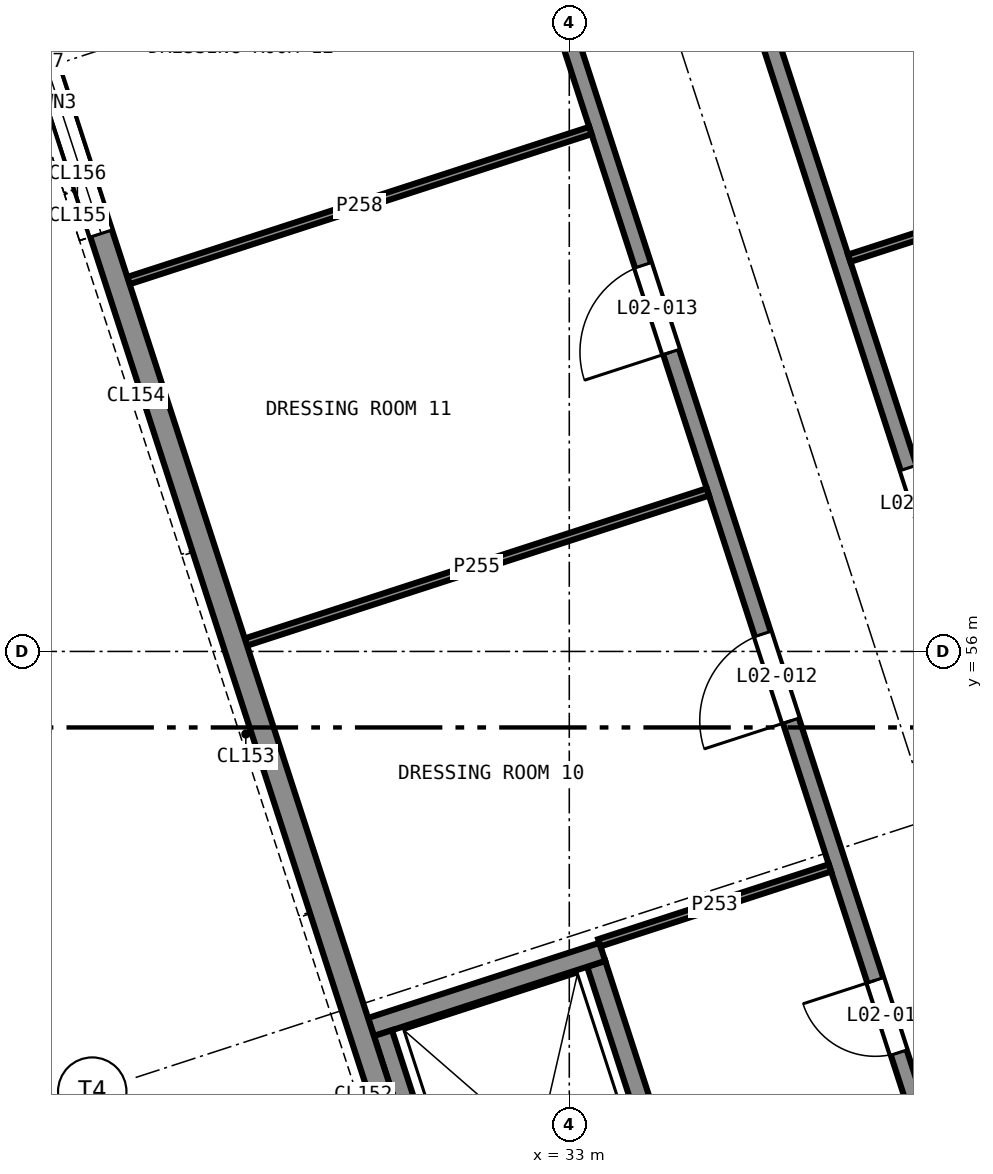
"""IFC4 building model, lengths in metres.
Left out: names, types, materials, properties, quantities, classifications, styles, units other than length and angle.
Written with IfcOpenShell. Run it as: python <this file> out.ifc"""

import sys

from ifc_helpers import new_model, si_unit, direction, frame, frame_2d, origin, place, context, subcontext, project, spatial, rectangle, extrude, element, fill, save


model = new_model("IFC4")
c1 = context("Model", 3, precision=1e-05, world=origin(), true_north=direction((0.0, 1.0)))
c2 = subcontext(c1, "Body", "Model", "MODEL_VIEW")
j1 = project(units=[si_unit("LENGTHUNIT", "METRE"), si_unit("PLANEANGLEUNIT", "RADIAN")], contexts=[c1])
p1 = place(None, origin())
s1 = spatial("IfcSite", under=j1, at=p1, CompositionType="ELEMENT")
p2 = place(p1, origin())
s2 = spatial("IfcBuilding", under=s1, at=p2, CompositionType="ELEMENT")
p3 = place(p2, frame((0.0, 0.0, 9.5)))
s3 = spatial("IfcBuildingStorey", under=s2, at=p3, CompositionType="ELEMENT", Elevation=9.5)
p4 = place(p3, frame((33.501, 41.003, 0.0), z_axis=(0.0, 0.0, 1.0), x_axis=(-0.309017194826, 0.951056451165, 0.0)))
e1 = element("IfcWall", 1, at=p4, inside=s3, PredefinedType="SOLIDWALL", context=c2, shape_type="SweptSolid", body=[
    extrude(rectangle(XDim=53.7, YDim=0.3, at=frame_2d((26.85, 0.0))), origin(), (0.0, 0.0, 1.0), 4.0),
])
p5 = place(p4, frame((21.55, 0.0, 0.9)))
e2 = element("IfcOpeningElement", 2, at=p5, cuts=e1, PredefinedType="OPENING", context=c2, shape_type="SweptSolid", body=[
    extrude(rectangle(XDim=3.6, YDim=2.1, at=frame_2d((1.8, 1.05))), frame((0.0, 0.16, 0.0), z_axis=(0.0, -1.0, 0.0), x_axis=(1.0, 0.0, 0.0)), (0.0, 0.0, 1.0), 0.32),
])
p6 = place(p3, frame((34.621, 47.991, 0.0), z_axis=(0.0, 0.0, 1.0), x_axis=(-0.309055103076, 0.951044133184, 0.0)))
e3 = element("IfcWall", 3, at=p6, inside=s3, PredefinedType="SHEAR", context=c2, shape_type="SweptSolid", body=[
    extrude(rectangle(XDim=4.1, YDim=0.25, at=frame_2d((2.05, 0.0))), origin(), (0.0, 0.0, 1.0), 4.0),
])
p7 = place(p3, frame((33.434, 52.048, 0.0), z_axis=(0.0, 0.0, 1.0), x_axis=(-0.951066581729, -0.308986014439, 0.0)))
e4 = element("IfcWall", 4, at=p7, inside=s3, PredefinedType="SHEAR", context=c2, shape_type="SweptSolid", body=[
    extrude(rectangle(XDim=3.2, YDim=0.25, at=frame_2d((1.6, 0.0))), origin(), (0.0, 0.0, 1.0), 4.0),
])
p8 = place(p3, frame((30.548, 50.979, 0.0), z_axis=(0.0, 0.0, 1.0), x_axis=(0.309055103076, -0.951044133184, 0.0)))
e5 = element("IfcWall", 5, at=p8, inside=s3, PredefinedType="SHEAR", context=c2, shape_type="SweptSolid", body=[
    extrude(rectangle(XDim=4.1, YDim=0.25, at=frame_2d((2.05, 0.0))), origin(), (0.0, 0.0, 1.0), 4.0),
])
p9 = place(p3, frame((37.956, 48.812, 0.0), z_axis=(0.0, 0.0, 1.0), x_axis=(-0.30901736393, 0.951056396219, 0.0)))
e6 = element("IfcWall", 6, at=p9, inside=s3, PredefinedType="SOLIDWALL", context=c2, shape_type="SweptSolid", body=[
    extrude(rectangle(XDim=41.7, YDim=0.22, at=frame_2d((20.85, 0.0))), origin(), (0.0, 0.0, 1.0), 3.7),
])
p10 = place(p9, frame((2.009, 0.0, 0.0)))
e7 = element("IfcOpeningElement", 7, at=p10, cuts=e6, PredefinedType="OPENING", context=c2, shape_type="SweptSolid", body=[
    extrude(rectangle(XDim=1.0, YDim=2.1, at=frame_2d((0.5, 1.05))), frame((0.0, 0.12, 0.0), z_axis=(0.0, -1.0, 0.0), x_axis=(1.0, 0.0, 0.0)), (0.0, 0.0, 1.0), 0.24),
])
p11 = place(p9, frame((6.6, 0.0, 0.0)))
e8 = element("IfcOpeningElement", 8, at=p11, cuts=e6, PredefinedType="OPENING", context=c2, shape_type="SweptSolid", body=[
    extrude(rectangle(XDim=1.2, YDim=2.1, at=frame_2d((0.6, 1.05))), frame((0.0, 0.12, 0.0), z_axis=(0.0, -1.0, 0.0), x_axis=(1.0, 0.0, 0.0)), (0.0, 0.0, 1.0), 0.24),
])
p12 = place(p9, frame((11.7, 0.0, 0.0)))
e9 = element("IfcOpeningElement", 9, at=p12, cuts=e6, PredefinedType="OPENING", context=c2, shape_type="SweptSolid", body=[
    extrude(rectangle(XDim=1.2, YDim=2.1, at=frame_2d((0.6, 1.05))), frame((0.0, 0.12, 0.0), z_axis=(0.0, -1.0, 0.0), x_axis=(1.0, 0.0, 0.0)), (0.0, 0.0, 1.0), 0.24),
])
p13 = place(p9, frame((16.7, 0.0, 0.0)))
e10 = element("IfcOpeningElement", 10, at=p13, cuts=e6, PredefinedType="OPENING", context=c2, shape_type="SweptSolid", body=[
    extrude(rectangle(XDim=1.2, YDim=2.1, at=frame_2d((0.6, 1.05))), frame((0.0, 0.12, 0.0), z_axis=(0.0, -1.0, 0.0), x_axis=(1.0, 0.0, 0.0)), (0.0, 0.0, 1.0), 0.24),
])
p14 = place(p9, frame((21.7, 0.0, 0.0)))
e11 = element("IfcOpeningElement", 11, at=p14, cuts=e6, PredefinedType="OPENING", context=c2, shape_type="SweptSolid", body=[
    extrude(rectangle(XDim=1.2, YDim=2.1, at=frame_2d((0.6, 1.05))), frame((0.0, 0.12, 0.0), z_axis=(0.0, -1.0, 0.0), x_axis=(1.0, 0.0, 0.0)), (0.0, 0.0, 1.0), 0.24),
])
p15 = place(p9, frame((26.7, 0.0, 0.0)))
e12 = element("IfcOpeningElement", 12, at=p15, cuts=e6, PredefinedType="OPENING", context=c2, shape_type="SweptSolid", body=[
    extrude(rectangle(XDim=1.2, YDim=2.1, at=frame_2d((0.6, 1.05))), frame((0.0, 0.12, 0.0), z_axis=(0.0, -1.0, 0.0), x_axis=(1.0, 0.0, 0.0)), (0.0, 0.0, 1.0), 0.24),
])
p16 = place(p9, frame((31.739, 0.0, 0.0)))
e13 = element("IfcOpeningElement", 13, at=p16, cuts=e6, PredefinedType="OPENING", context=c2, shape_type="SweptSolid", body=[
    extrude(rectangle(XDim=1.2, YDim=2.1, at=frame_2d((0.6, 1.05))), frame((0.0, 0.12, 0.0), z_axis=(0.0, -1.0, 0.0), x_axis=(1.0, 0.0, 0.0)), (0.0, 0.0, 1.0), 0.24),
])
p17 = place(p3, frame((40.333, 49.584, 0.0), z_axis=(0.0, 0.0, 1.0), x_axis=(-0.309015643281, 0.951056955291, 0.0)))
e14 = element("IfcWall", 14, at=p17, inside=s3, PredefinedType="SOLIDWALL", context=c2, shape_type="SweptSolid", body=[
    extrude(rectangle(XDim=41.7, YDim=0.22, at=frame_2d((20.85, 0.0))), origin(), (0.0, 0.0, 1.0), 3.7),
])
p18 = place(p17, frame((1.9, 0.0, 0.0)))
e15 = element("IfcOpeningElement", 15, at=p18, cuts=e14, PredefinedType="OPENING", context=c2, shape_type="SweptSolid", body=[
    extrude(rectangle(XDim=1.2, YDim=2.1, at=frame_2d((0.6, 1.05))), frame((0.0, 0.12, 0.0), z_axis=(0.0, -1.0, 0.0), x_axis=(1.0, 0.0, 0.0)), (0.0, 0.0, 1.0), 0.24),
])
p19 = place(p17, frame((8.285, 0.0, 0.0)))
e16 = element("IfcOpeningElement", 16, at=p19, cuts=e14, PredefinedType="OPENING", context=c2, shape_type="SweptSolid", body=[
    extrude(rectangle(XDim=1.0, YDim=2.1, at=frame_2d((0.5, 1.05))), frame((0.0, 0.12, 0.0), z_axis=(0.0, -1.0, 0.0), x_axis=(1.0, 0.0, 0.0)), (0.0, 0.0, 1.0), 0.24),
])
p20 = place(p17, frame((16.475, 0.0, 0.0)))
e17 = element("IfcOpeningElement", 17, at=p20, cuts=e14, PredefinedType="OPENING", context=c2, shape_type="SweptSolid", body=[
    extrude(rectangle(XDim=1.0, YDim=2.1, at=frame_2d((0.5, 1.05))), frame((0.0, 0.12, 0.0), z_axis=(0.0, -1.0, 0.0), x_axis=(1.0, 0.0, 0.0)), (0.0, 0.0, 1.0), 0.24),
])
p21 = place(p17, frame((25.752, 0.0, 0.0)))
e18 = element("IfcOpeningElement", 18, at=p21, cuts=e14, PredefinedType="OPENING", context=c2, shape_type="SweptSolid", body=[
    extrude(rectangle(XDim=1.0, YDim=2.1, at=frame_2d((0.5, 1.05))), frame((0.0, 0.12, 0.0), z_axis=(0.0, -1.0, 0.0), x_axis=(1.0, 0.0, 0.0)), (0.0, 0.0, 1.0), 0.24),
])
p22 = place(p17, frame((32.761, 0.0, 0.0)))
e19 = element("IfcOpeningElement", 19, at=p22, cuts=e14, PredefinedType="OPENING", context=c2, shape_type="SweptSolid", body=[
    extrude(rectangle(XDim=1.0, YDim=2.1, at=frame_2d((0.5, 1.05))), frame((0.0, 0.12, 0.0), z_axis=(0.0, -1.0, 0.0), x_axis=(1.0, 0.0, 0.0)), (0.0, 0.0, 1.0), 0.24),
])
p23 = place(p3, frame((33.396, 52.167, 0.0), z_axis=(0.0, 0.0, 1.0), x_axis=(0.951044192343, 0.309054921027, 0.0)))
e20 = element("IfcWall", 20, at=p23, inside=s3, PredefinedType="PARTITIONING", context=c2, shape_type="SweptSolid", body=[
    extrude(rectangle(XDim=3.19, YDim=0.1, at=frame_2d((1.595, 0.0))), origin(), (0.0, 0.0, 1.0), 3.7),
])
p24 = place(p3, frame((28.745, 56.123, 0.0), z_axis=(0.0, 0.0, 1.0), x_axis=(0.951059053869, 0.309009184417, 0.0)))
e21 = element("IfcWall", 21, at=p24, inside=s3, PredefinedType="PARTITIONING", context=c2, shape_type="SweptSolid", body=[
    extrude(rectangle(XDim=6.39, YDim=0.1, at=frame_2d((3.195, 0.0))), origin(), (0.0, 0.0, 1.0), 3.7),
])
p25 = place(p3, frame((36.683, 61.173, 0.0), z_axis=(0.0, 0.0, 1.0), x_axis=(0.95105616864, 0.309018064344, 0.0)))
e22 = element("IfcWall", 22, at=p25, inside=s3, PredefinedType="PARTITIONING", context=c2, shape_type="SweptSolid", body=[
    extrude(rectangle(XDim=4.14, YDim=0.1, at=frame_2d((2.07, 0.0))), origin(), (0.0, 0.0, 1.0), 3.7),
])
p26 = place(p3, frame((27.2, 60.878, 0.0), z_axis=(0.0, 0.0, 1.0), x_axis=(0.951055405517, 0.309020412977, 0.0)))
e23 = element("IfcWall", 23, at=p26, inside=s3, PredefinedType="PARTITIONING", context=c2, shape_type="SweptSolid", body=[
    extrude(rectangle(XDim=6.39, YDim=0.1, at=frame_2d((3.195, 0.0))), origin(), (0.0, 0.0, 1.0), 3.7),
])
p27 = place(p5, origin())
e24 = element("IfcWindow", 24, at=p27, inside=s3, PartitioningType="SINGLE_PANEL", PredefinedType="WINDOW", context=c2, shape_type="SweptSolid", body=[
    extrude(rectangle(XDim=3.6, YDim=2.1, at=frame_2d((1.8, 1.05))), frame((0.0, 0.03, 0.0), z_axis=(0.0, -1.0, 0.0), x_axis=(1.0, 0.0, 0.0)), (0.0, 0.0, 1.0), 0.06),
])
fill(e2, e24)
p28 = place(p10, origin())
e25 = element("IfcDoor", 25, at=p28, inside=s3, OperationType="SINGLE_SWING_LEFT", PredefinedType="DOOR", context=c2, shape_type="SweptSolid", body=[
    extrude(rectangle(XDim=1.0, YDim=2.1, at=frame_2d((0.5, 1.05))), frame((0.0, 0.025, 0.0), z_axis=(0.0, -1.0, 0.0), x_axis=(1.0, 0.0, 0.0)), (0.0, 0.0, 1.0), 0.05),
])
fill(e7, e25)
p29 = place(p11, origin())
e26 = element("IfcDoor", 26, at=p29, inside=s3, OperationType="SINGLE_SWING_RIGHT", PredefinedType="DOOR", context=c2, shape_type="SweptSolid", body=[
    extrude(rectangle(XDim=1.2, YDim=2.1, at=frame_2d((0.6, 1.05))), frame((0.0, 0.025, 0.0), z_axis=(0.0, -1.0, 0.0), x_axis=(1.0, 0.0, 0.0)), (0.0, 0.0, 1.0), 0.05),
])
fill(e8, e26)
p30 = place(p12, origin())
e27 = element("IfcDoor", 27, at=p30, inside=s3, OperationType="SINGLE_SWING_RIGHT", PredefinedType="DOOR", context=c2, shape_type="SweptSolid", body=[
    extrude(rectangle(XDim=1.2, YDim=2.1, at=frame_2d((0.6, 1.05))), frame((0.0, 0.025, 0.0), z_axis=(0.0, -1.0, 0.0), x_axis=(1.0, 0.0, 0.0)), (0.0, 0.0, 1.0), 0.05),
])
fill(e9, e27)
p31 = place(p19, frame((1.0, 0.0, 0.0), z_axis=(0.0, 0.0, 1.0), x_axis=(-1.0, 0.0, 0.0)))
e28 = element("IfcDoor", 28, at=p31, inside=s3, OperationType="SINGLE_SWING_LEFT", PredefinedType="DOOR", context=c2, shape_type="SweptSolid", body=[
    extrude(rectangle(XDim=1.0, YDim=2.1, at=frame_2d((0.5, 1.05))), frame((0.0, 0.025, 0.0), z_axis=(0.0, -1.0, 0.0), x_axis=(1.0, 0.0, 0.0)), (0.0, 0.0, 1.0), 0.05),
])
fill(e16, e28)
save(model, sys.argv[1])
